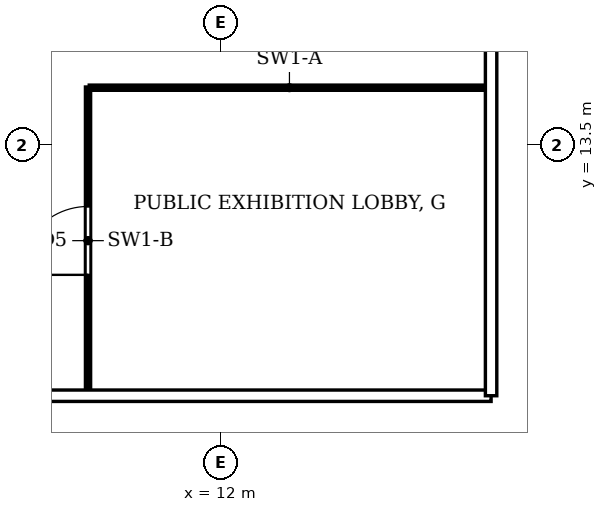
"""IFC4 building model, lengths in metres.
Left out: names, types, materials, properties, quantities, classifications, styles, units other than length and angle.
Written with IfcOpenShell. Run it as: python <this file> out.ifc"""

import sys

from ifc_helpers import new_model, si_unit, direction, frame, frame_2d, origin, place, context, subcontext, project, spatial, rectangle, extrude, element, fill, save


model = new_model("IFC4")
c1 = context("Model", 3, precision=1e-05, world=origin(), true_north=direction((0.0, 1.0)))
c2 = subcontext(c1, "Body", "Model", "MODEL_VIEW")
j1 = project(units=[si_unit("LENGTHUNIT", "METRE"), si_unit("PLANEANGLEUNIT", "RADIAN")], contexts=[c1])
p1 = place(None, origin())
s1 = spatial("IfcSite", under=j1, at=p1, CompositionType="ELEMENT")
p2 = place(p1, origin())
s2 = spatial("IfcBuilding", under=s1, at=p2, CompositionType="ELEMENT")
p3 = place(p2, origin())
s3 = spatial("IfcBuildingStorey", under=s2, at=p3, CompositionType="ELEMENT", Elevation=0.0)
p4 = place(p3, frame((8.5, 6.95, 0.0), z_axis=(0.0, 0.0, 1.0), x_axis=(0.0, 1.0, 0.0)))
e1 = element("IfcWall", 1, at=p4, inside=s3, PredefinedType="PARTITIONING", context=c2, shape_type="SweptSolid", body=[
    extrude(rectangle(XDim=8.05, YDim=0.1, at=frame_2d((4.025, 0.0))), origin(), (0.0, 0.0, 1.0), 8.87),
])
p5 = place(p4, frame((3.125, 0.0, 0.0)))
e2 = element("IfcOpeningElement", 2, at=p5, cuts=e1, PredefinedType="OPENING", context=c2, shape_type="SweptSolid", body=[
    extrude(rectangle(XDim=1.8, YDim=2.4, at=frame_2d((0.9, 1.2))), frame((0.0, 0.06, 0.0), z_axis=(0.0, -1.0, 0.0), x_axis=(1.0, 0.0, 0.0)), (0.0, 0.0, 1.0), 0.12),
])
p6 = place(p3, frame((8.55, 15.0, 0.0), z_axis=(0.0, 0.0, 1.0), x_axis=(1.0, 0.0, 0.0)))
e3 = element("IfcWall", 3, at=p6, inside=s3, PredefinedType="PARTITIONING", context=c2, shape_type="SweptSolid", body=[
    extrude(rectangle(XDim=10.5, YDim=0.1, at=frame_2d((5.25, 0.0))), origin(), (0.0, 0.0, 1.0), 8.24),
])
p7 = place(p5, origin())
e4 = element("IfcDoor", 4, at=p7, inside=s3, OperationType="DOUBLE_DOOR_SINGLE_SWING", PredefinedType="DOOR", context=c2, shape_type="SweptSolid", body=[
    extrude(rectangle(XDim=1.8, YDim=2.4, at=frame_2d((0.9, 1.2))), frame((0.0, 0.025, 0.0), z_axis=(0.0, -1.0, 0.0), x_axis=(1.0, 0.0, 0.0)), (0.0, 0.0, 1.0), 0.05),
])
fill(e2, e4)
save(model, sys.argv[1])
